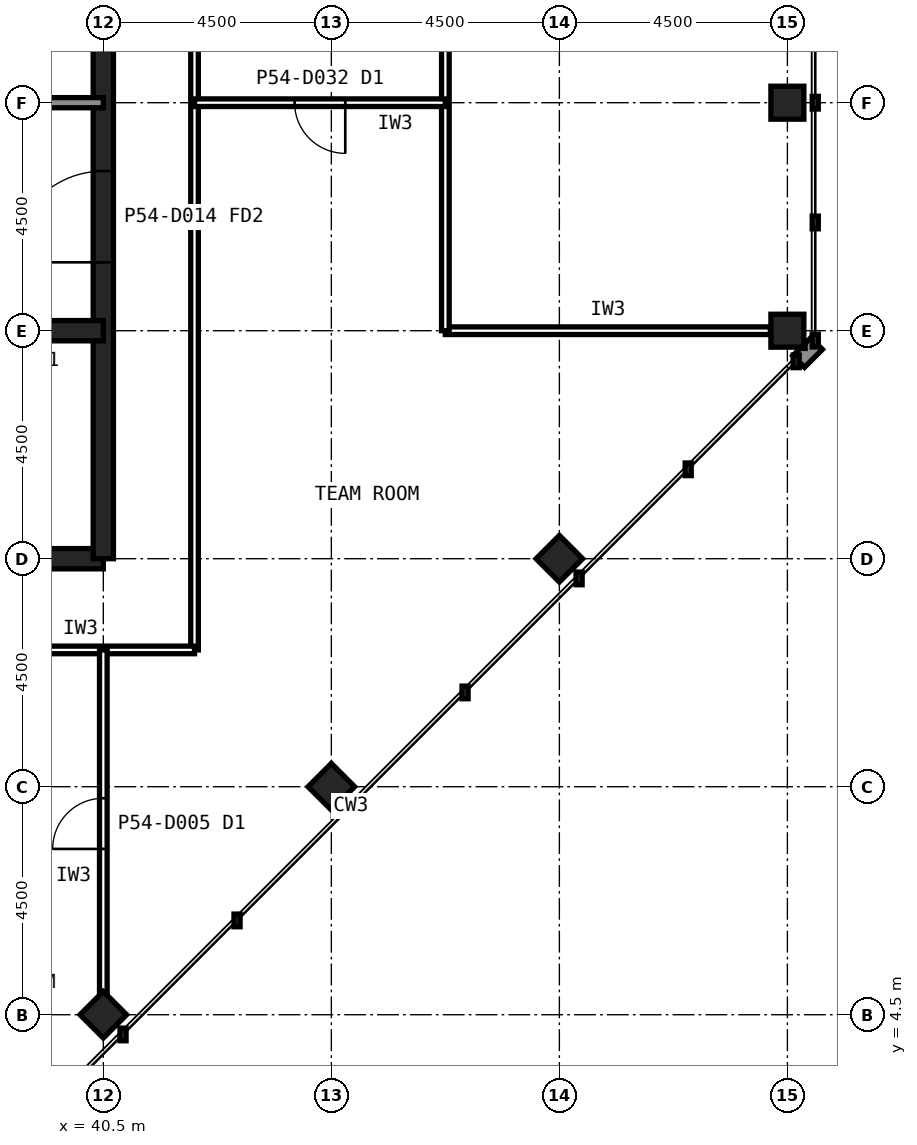
"""IFC4 building model, lengths in metres.
Left out: names, types, materials, properties, quantities, classifications, styles, units other than length and angle.
Written with IfcOpenShell. Run it as: python <this file> out.ifc"""

import sys

from ifc_helpers import new_model, si_unit, direction, frame, frame_2d, origin, origin_2d, place, context, subcontext, project, spatial, rectangle, hollow_rectangle, extrude, element, fill, save


model = new_model("IFC4")
c1 = context("Model", 3, precision=1e-05, world=origin(), true_north=direction((0.0, 1.0)))
c2 = subcontext(c1, "Body", "Model", "MODEL_VIEW")
j1 = project(units=[si_unit("LENGTHUNIT", "METRE"), si_unit("PLANEANGLEUNIT", "RADIAN")], contexts=[c1])
p1 = place(None, origin())
s1 = spatial("IfcSite", under=j1, at=p1, CompositionType="ELEMENT")
p2 = place(p1, origin())
s2 = spatial("IfcBuilding", under=s1, at=p2, CompositionType="ELEMENT")
p3 = place(p2, frame((0.0, 0.0, 230.6)))
s3 = spatial("IfcBuildingStorey", under=s2, at=p3, CompositionType="ELEMENT", Elevation=230.6)
for number, where, z_axis, x_axis in (
    (1, (54.0, 18.0, 0.0), (0.0, 0.0, 1.0), (1.0, 0.0, 0.0)),
    (2, (54.0, 22.5, 0.0), (0.0, 0.0, 1.0), (1.0, 0.0, 0.0)),
    (3, (40.5, 4.5, 0.0), (0.0, 0.0, 1.0), (0.707, 0.707, 0.0)),
    (4, (45.0, 9.0, 0.0), (0.0, 0.0, 1.0), (0.707, 0.707, 0.0)),
    (5, (49.5, 13.5, 0.0), (0.0, 0.0, 1.0), (0.707, 0.707, 0.0)),
):
    element("IfcColumn", number, at=place(p3, frame(where, z_axis=z_axis, x_axis=x_axis)), inside=s3, PredefinedType="COLUMN", context=c2, shape_type="SweptSolid", body=[
        extrude(hollow_rectangle(XDim=0.65, YDim=0.65, WallThickness=0.032, at=origin_2d()), origin(), (0.0, 0.0, 1.0), 4.0),
    ])
p4 = place(p3, frame((13.5, 13.5, 0.0), z_axis=(0.0, 0.0, 1.0), x_axis=(1.0, 0.0, 0.0)))
e6 = element("IfcWall", 6, at=p4, inside=s3, PredefinedType="SHEAR", context=c2, shape_type="SweptSolid", body=[
    extrude(rectangle(XDim=27.0, YDim=0.4, at=frame_2d((13.5, 0.0))), origin(), (0.0, 0.0, 1.0), 4.0),
])
p5 = place(p3, frame((40.5, 13.5, 0.0), z_axis=(0.0, 0.0, 1.0), x_axis=(0.0, 1.0, 0.0)))
e7 = element("IfcWall", 7, at=p5, inside=s3, PredefinedType="SHEAR", context=c2, shape_type="SweptSolid", body=[
    extrude(rectangle(XDim=27.0, YDim=0.4, at=frame_2d((13.5, 0.0))), origin(), (0.0, 0.0, 1.0), 4.0),
])
p6 = place(p5, frame((5.85, 0.0, 0.0)))
e8 = element("IfcOpeningElement", 8, at=p6, cuts=e7, PredefinedType="OPENING", context=c2, shape_type="SweptSolid", body=[
    extrude(rectangle(XDim=1.8, YDim=2.1, at=frame_2d((0.9, 1.05))), frame((0.0, 0.21, 0.0), z_axis=(0.0, -1.0, 0.0), x_axis=(1.0, 0.0, 0.0)), (0.0, 0.0, 1.0), 0.42),
])
p7 = place(p5, frame((19.65, 0.0, 0.0)))
e9 = element("IfcOpeningElement", 9, at=p7, cuts=e7, PredefinedType="OPENING", context=c2, shape_type="SweptSolid", body=[
    extrude(rectangle(XDim=1.2, YDim=2.1, at=frame_2d((0.6, 1.05))), frame((0.0, 0.21, 0.0), z_axis=(0.0, -1.0, 0.0), x_axis=(1.0, 0.0, 0.0)), (0.0, 0.0, 1.0), 0.42),
])
p8 = place(p3, frame((13.5, 18.0, 0.0), z_axis=(0.0, 0.0, 1.0), x_axis=(1.0, 0.0, 0.0)))
e10 = element("IfcWall", 10, at=p8, inside=s3, PredefinedType="SHEAR", context=c2, shape_type="SweptSolid", body=[
    extrude(rectangle(XDim=27.0, YDim=0.4, at=frame_2d((13.5, 0.0))), origin(), (0.0, 0.0, 1.0), 4.0),
])
p9 = place(p8, frame((24.3, 0.0, 0.0)))
e11 = element("IfcOpeningElement", 11, at=p9, cuts=e10, PredefinedType="OPENING", context=c2, shape_type="SweptSolid", body=[
    extrude(rectangle(XDim=0.9, YDim=2.1, at=frame_2d((0.45, 1.05))), frame((0.0, 0.21, 0.0), z_axis=(0.0, -1.0, 0.0), x_axis=(1.0, 0.0, 0.0)), (0.0, 0.0, 1.0), 0.42),
])
p10 = place(p8, frame((5.45, 0.0, 0.0)))
e12 = element("IfcOpeningElement", 12, at=p10, cuts=e10, PredefinedType="OPENING", context=c2, shape_type="SweptSolid", body=[
    extrude(rectangle(XDim=1.1, YDim=2.1, at=frame_2d((0.55, 1.05))), frame((0.0, 0.21, 0.0), z_axis=(0.0, -1.0, 0.0), x_axis=(1.0, 0.0, 0.0)), (0.0, 0.0, 1.0), 0.42),
])
p11 = place(p8, frame((8.45, 0.0, 0.0)))
e13 = element("IfcOpeningElement", 13, at=p11, cuts=e10, PredefinedType="OPENING", context=c2, shape_type="SweptSolid", body=[
    extrude(rectangle(XDim=1.1, YDim=2.1, at=frame_2d((0.55, 1.05))), frame((0.0, 0.21, 0.0), z_axis=(0.0, -1.0, 0.0), x_axis=(1.0, 0.0, 0.0)), (0.0, 0.0, 1.0), 0.42),
])
p12 = place(p8, frame((11.45, 0.0, 0.0)))
e14 = element("IfcOpeningElement", 14, at=p12, cuts=e10, PredefinedType="OPENING", context=c2, shape_type="SweptSolid", body=[
    extrude(rectangle(XDim=1.1, YDim=2.1, at=frame_2d((0.55, 1.05))), frame((0.0, 0.21, 0.0), z_axis=(0.0, -1.0, 0.0), x_axis=(1.0, 0.0, 0.0)), (0.0, 0.0, 1.0), 0.42),
])
p13 = place(p8, frame((14.45, 0.0, 0.0)))
e15 = element("IfcOpeningElement", 15, at=p13, cuts=e10, PredefinedType="OPENING", context=c2, shape_type="SweptSolid", body=[
    extrude(rectangle(XDim=1.1, YDim=2.1, at=frame_2d((0.55, 1.05))), frame((0.0, 0.21, 0.0), z_axis=(0.0, -1.0, 0.0), x_axis=(1.0, 0.0, 0.0)), (0.0, 0.0, 1.0), 0.42),
])
p14 = place(p8, frame((17.45, 0.0, 0.0)))
e16 = element("IfcOpeningElement", 16, at=p14, cuts=e10, PredefinedType="OPENING", context=c2, shape_type="SweptSolid", body=[
    extrude(rectangle(XDim=1.1, YDim=2.1, at=frame_2d((0.55, 1.05))), frame((0.0, 0.21, 0.0), z_axis=(0.0, -1.0, 0.0), x_axis=(1.0, 0.0, 0.0)), (0.0, 0.0, 1.0), 0.42),
])
p15 = place(p8, frame((20.45, 0.0, 0.0)))
e17 = element("IfcOpeningElement", 17, at=p15, cuts=e10, PredefinedType="OPENING", context=c2, shape_type="SweptSolid", body=[
    extrude(rectangle(XDim=1.1, YDim=2.1, at=frame_2d((0.55, 1.05))), frame((0.0, 0.21, 0.0), z_axis=(0.0, -1.0, 0.0), x_axis=(1.0, 0.0, 0.0)), (0.0, 0.0, 1.0), 0.42),
])
p16 = place(p8, frame((1.6, 0.0, 0.0)))
e18 = element("IfcOpeningElement", 18, at=p16, cuts=e10, PredefinedType="OPENING", context=c2, shape_type="SweptSolid", body=[
    extrude(rectangle(XDim=1.3, YDim=2.2, at=frame_2d((0.65, 1.1))), frame((0.0, 0.21, 0.0), z_axis=(0.0, -1.0, 0.0), x_axis=(1.0, 0.0, 0.0)), (0.0, 0.0, 1.0), 0.42),
])
p17 = place(p3, frame((13.5, 22.5, 0.0), z_axis=(0.0, 0.0, 1.0), x_axis=(1.0, 0.0, 0.0)))
e19 = element("IfcWall", 19, at=p17, inside=s3, PredefinedType="SOLIDWALL", context=c2, shape_type="SweptSolid", body=[
    extrude(rectangle(XDim=27.0, YDim=0.2, at=frame_2d((13.5, 0.0))), origin(), (0.0, 0.0, 1.0), 3.84),
])
p18 = place(p17, frame((1.65, 0.0, 0.0)))
e20 = element("IfcOpeningElement", 20, at=p18, cuts=e19, PredefinedType="OPENING", context=c2, shape_type="SweptSolid", body=[
    extrude(rectangle(XDim=1.2, YDim=2.1, at=frame_2d((0.6, 1.05))), frame((0.0, 0.11, 0.0), z_axis=(0.0, -1.0, 0.0), x_axis=(1.0, 0.0, 0.0)), (0.0, 0.0, 1.0), 0.22),
])
p19 = place(p17, frame((6.025, 0.0, 0.0)))
e21 = element("IfcOpeningElement", 21, at=p19, cuts=e19, PredefinedType="OPENING", context=c2, shape_type="SweptSolid", body=[
    extrude(rectangle(XDim=1.0, YDim=2.1, at=frame_2d((0.5, 1.05))), frame((0.0, 0.11, 0.0), z_axis=(0.0, -1.0, 0.0), x_axis=(1.0, 0.0, 0.0)), (0.0, 0.0, 1.0), 0.22),
])
p20 = place(p17, frame((10.525, 0.0, 0.0)))
e22 = element("IfcOpeningElement", 22, at=p20, cuts=e19, PredefinedType="OPENING", context=c2, shape_type="SweptSolid", body=[
    extrude(rectangle(XDim=1.0, YDim=2.1, at=frame_2d((0.5, 1.05))), frame((0.0, 0.11, 0.0), z_axis=(0.0, -1.0, 0.0), x_axis=(1.0, 0.0, 0.0)), (0.0, 0.0, 1.0), 0.22),
])
p21 = place(p17, frame((19.75, 0.0, 0.0)))
e23 = element("IfcOpeningElement", 23, at=p21, cuts=e19, PredefinedType="OPENING", context=c2, shape_type="SweptSolid", body=[
    extrude(rectangle(XDim=1.0, YDim=2.1, at=frame_2d((0.5, 1.05))), frame((0.0, 0.11, 0.0), z_axis=(0.0, -1.0, 0.0), x_axis=(1.0, 0.0, 0.0)), (0.0, 0.0, 1.0), 0.22),
])
p22 = place(p17, frame((15.05, 0.0, 0.0)))
e24 = element("IfcOpeningElement", 24, at=p22, cuts=e19, PredefinedType="OPENING", context=c2, shape_type="SweptSolid", body=[
    extrude(rectangle(XDim=1.4, YDim=2.4, at=frame_2d((0.7, 1.2))), frame((0.0, 0.11, 0.0), z_axis=(0.0, -1.0, 0.0), x_axis=(1.0, 0.0, 0.0)), (0.0, 0.0, 1.0), 0.22),
])
p23 = place(p3, frame((42.3, 11.7, 0.0), z_axis=(0.0, 0.0, 1.0), x_axis=(0.0, 1.0, 0.0)))
e25 = element("IfcWall", 25, at=p23, inside=s3, PredefinedType="PARTITIONING", context=c2, shape_type="SweptSolid", body=[
    extrude(rectangle(XDim=34.2, YDim=0.15, at=frame_2d((17.1, 0.0))), origin(), (0.0, 0.0, 1.0), 3.84),
])
p24 = place(p23, frame((16.6, 0.0, 0.0)))
e26 = element("IfcOpeningElement", 26, at=p24, cuts=e25, PredefinedType="OPENING", context=c2, shape_type="SweptSolid", body=[
    extrude(rectangle(XDim=1.0, YDim=2.1, at=frame_2d((0.5, 1.05))), frame((0.0, 0.085, 0.0), z_axis=(0.0, -1.0, 0.0), x_axis=(1.0, 0.0, 0.0)), (0.0, 0.0, 1.0), 0.17),
])
p25 = place(p3, frame((37.8, 11.7, 0.0), z_axis=(0.0, 0.0, 1.0), x_axis=(1.0, 0.0, 0.0)))
e27 = element("IfcWall", 27, at=p25, inside=s3, PredefinedType="PARTITIONING", context=c2, shape_type="SweptSolid", body=[
    extrude(rectangle(XDim=4.5, YDim=0.15, at=frame_2d((2.25, 0.0))), origin(), (0.0, 0.0, 1.0), 3.84),
])
p26 = place(p3, frame((47.25, 18.0, 0.0), z_axis=(0.0, 0.0, 1.0), x_axis=(1.0, 0.0, 0.0)))
e28 = element("IfcWall", 28, at=p26, inside=s3, PredefinedType="PARTITIONING", context=c2, shape_type="SweptSolid", body=[
    extrude(rectangle(XDim=6.415, YDim=0.15, at=frame_2d((3.208, 0.0))), origin(), (0.0, 0.0, 1.0), 2.989),
])
p27 = place(p3, frame((47.25, 36.0, 0.0), z_axis=(0.0, 0.0, 1.0), x_axis=(0.0, -1.0, 0.0)))
e29 = element("IfcWall", 29, at=p27, inside=s3, PredefinedType="PARTITIONING", context=c2, shape_type="SweptSolid", body=[
    extrude(rectangle(XDim=18.0, YDim=0.15, at=frame_2d((9.0, 0.0))), origin(), (0.0, 0.0, 1.0), 3.84),
])
p28 = place(p27, frame((8.1, 0.0, 0.0)))
e30 = element("IfcOpeningElement", 30, at=p28, cuts=e29, PredefinedType="OPENING", context=c2, shape_type="SweptSolid", body=[
    extrude(rectangle(XDim=1.8, YDim=2.4, at=frame_2d((0.9, 1.2))), frame((0.0, 0.085, 0.0), z_axis=(0.0, -1.0, 0.0), x_axis=(1.0, 0.0, 0.0)), (0.0, 0.0, 1.0), 0.17),
])
p29 = place(p3, frame((47.25, 22.5, 0.0), z_axis=(0.0, 0.0, 1.0), x_axis=(-1.0, 0.0, 0.0)))
e31 = element("IfcWall", 31, at=p29, inside=s3, PredefinedType="PARTITIONING", context=c2, shape_type="SweptSolid", body=[
    extrude(rectangle(XDim=4.95, YDim=0.15, at=frame_2d((2.475, 0.0))), origin(), (0.0, 0.0, 1.0), 2.989),
])
p30 = place(p29, frame((1.975, 0.0, 0.0)))
e32 = element("IfcOpeningElement", 32, at=p30, cuts=e31, PredefinedType="OPENING", context=c2, shape_type="SweptSolid", body=[
    extrude(rectangle(XDim=1.0, YDim=2.1, at=frame_2d((0.5, 1.05))), frame((0.0, 0.085, 0.0), z_axis=(0.0, -1.0, 0.0), x_axis=(1.0, 0.0, 0.0)), (0.0, 0.0, 1.0), 0.17),
])
p31 = place(p3, frame((40.5, 4.845, 0.0), z_axis=(0.0, 0.0, 1.0), x_axis=(0.0, 1.0, 0.0)))
e33 = element("IfcWall", 33, at=p31, inside=s3, PredefinedType="PARTITIONING", context=c2, shape_type="SweptSolid", body=[
    extrude(rectangle(XDim=6.855, YDim=0.15, at=frame_2d((3.427, 0.0))), origin(), (0.0, 0.0, 1.0), 2.989),
])
p32 = place(p31, frame((2.927, 0.0, 0.0)))
e34 = element("IfcOpeningElement", 34, at=p32, cuts=e33, PredefinedType="OPENING", context=c2, shape_type="SweptSolid", body=[
    extrude(rectangle(XDim=1.0, YDim=2.1, at=frame_2d((0.5, 1.05))), frame((0.0, 0.085, 0.0), z_axis=(0.0, -1.0, 0.0), x_axis=(1.0, 0.0, 0.0)), (0.0, 0.0, 1.0), 0.17),
])
p33 = place(p6, origin())
e35 = element("IfcDoor", 35, at=p33, inside=s3, OperationType="SINGLE_SWING_LEFT", PredefinedType="DOOR", context=c2, shape_type="SweptSolid", body=[
    extrude(rectangle(XDim=1.8, YDim=2.1, at=frame_2d((0.9, 1.05))), frame((0.0, 0.025, 0.0), z_axis=(0.0, -1.0, 0.0), x_axis=(1.0, 0.0, 0.0)), (0.0, 0.0, 1.0), 0.05),
])
fill(e8, e35)
p34 = place(p30, origin())
e36 = element("IfcDoor", 36, at=p34, inside=s3, OperationType="SINGLE_SWING_LEFT", PredefinedType="DOOR", context=c2, shape_type="SweptSolid", body=[
    extrude(rectangle(XDim=1.0, YDim=2.1, at=frame_2d((0.5, 1.05))), frame((0.0, 0.025, 0.0), z_axis=(0.0, -1.0, 0.0), x_axis=(1.0, 0.0, 0.0)), (0.0, 0.0, 1.0), 0.05),
])
fill(e32, e36)
p35 = place(p32, origin())
e37 = element("IfcDoor", 37, at=p35, inside=s3, OperationType="SINGLE_SWING_LEFT", PredefinedType="DOOR", context=c2, shape_type="SweptSolid", body=[
    extrude(rectangle(XDim=1.0, YDim=2.1, at=frame_2d((0.5, 1.05))), frame((0.0, 0.025, 0.0), z_axis=(0.0, -1.0, 0.0), x_axis=(1.0, 0.0, 0.0)), (0.0, 0.0, 1.0), 0.05),
])
fill(e34, e37)
save(model, sys.argv[1])
